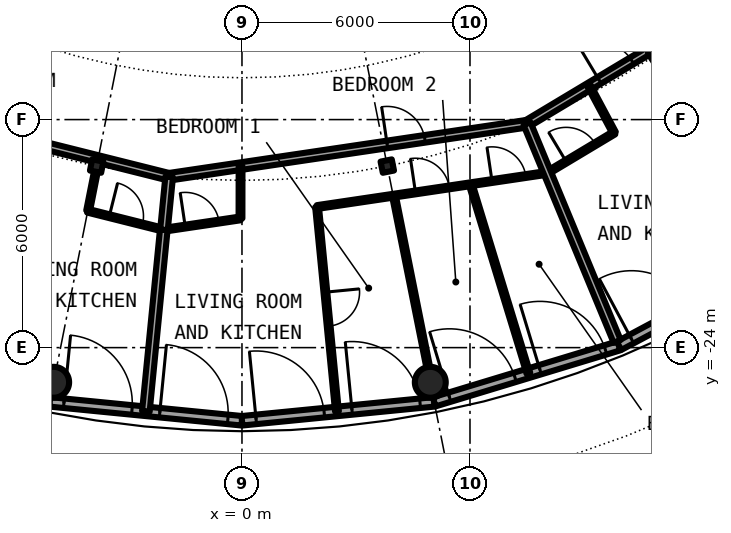
"""IFC4 building model, lengths in metres.
Left out: names, types, materials, properties, quantities, classifications, styles, units other than length and angle.
Written with IfcOpenShell. Run it as: python <this file> out.ifc"""

import sys

from ifc_helpers import new_model, si_unit, direction, frame, frame_2d, origin, origin_2d, place, context, subcontext, project, spatial, rectangle, hollow_circle, i_section, extrude, element, fill, save


model = new_model("IFC4")
c1 = context("Model", 3, precision=1e-05, world=origin(), true_north=direction((0.0, 1.0)))
c2 = subcontext(c1, "Body", "Model", "MODEL_VIEW")
j1 = project(units=[si_unit("LENGTHUNIT", "METRE"), si_unit("PLANEANGLEUNIT", "RADIAN")], contexts=[c1])
p1 = place(None, origin())
s1 = spatial("IfcSite", under=j1, at=p1, CompositionType="ELEMENT")
p2 = place(p1, origin())
s2 = spatial("IfcBuilding", under=s1, at=p2, CompositionType="ELEMENT")
p3 = place(p2, frame((0.0, 0.0, 237.1)))
s3 = spatial("IfcBuildingStorey", under=s2, at=p3, CompositionType="ELEMENT", Elevation=237.1)
for number, where, z_axis, x_axis in (
    (1, (-4.955, -24.912, 0.0), (0.0, 0.0, 1.0), (1.0, 0.0, 0.0)),
    (2, (4.955, -24.912, 0.0), (0.0, 0.0, 1.0), (1.0, 0.0, 0.0)),
):
    element("IfcColumn", number, at=place(p3, frame(where, z_axis=z_axis, x_axis=x_axis)), inside=s3, PredefinedType="COLUMN", context=c2, shape_type="SweptSolid", body=[
        extrude(hollow_circle(Radius=0.406, WallThickness=0.03, at=origin_2d()), origin(), (0.0, 0.0, 1.0), 3.05),
    ])
for number, where, z_axis, x_axis in (
    (3, (-3.824, -19.223, 0.0), (0.0, 0.0, 1.0), (-0.195, -0.981, 0.0)),
    (4, (3.824, -19.223, 0.0), (0.0, 0.0, 1.0), (0.195, -0.981, 0.0)),
    (5, (10.889, -16.297, 0.0), (0.0, 0.0, 1.0), (0.556, -0.831, 0.0)),
):
    element("IfcColumn", number, at=place(p3, frame(where, z_axis=z_axis, x_axis=x_axis)), inside=s3, PredefinedType="COLUMN", context=c2, shape_type="SweptSolid", body=[
        extrude(i_section(OverallWidth=0.3, OverallDepth=0.3, WebThickness=0.011, FlangeThickness=0.019, FilletRadius=0.027, at=origin_2d()), origin(), (0.0, 0.0, 1.0), 3.05),
    ])
p4 = place(p3, frame((-5.058, -25.427, 0.0), z_axis=(0.0, 0.0, 1.0), x_axis=(0.995187279479, -0.097991217788, 0.0)))
e6 = element("IfcWall", 6, at=p4, inside=s3, PredefinedType="SOLIDWALL", context=c2, shape_type="SweptSolid", body=[
    extrude(rectangle(XDim=5.083, YDim=0.25, at=frame_2d((2.541, 0.0))), origin(), (0.0, 0.0, 1.0), 2.7),
])
p5 = place(p4, frame((0.374, 0.0, 0.0)))
e7 = element("IfcOpeningElement", 7, at=p5, cuts=e6, PredefinedType="OPENING", context=c2, shape_type="SweptSolid", body=[
    extrude(rectangle(XDim=1.8, YDim=2.2, at=frame_2d((0.9, 1.1))), frame((0.0, 0.135, 0.0), z_axis=(0.0, -1.0, 0.0), x_axis=(1.0, 0.0, 0.0)), (0.0, 0.0, 1.0), 0.27),
])
p6 = place(p4, frame((2.909, 0.0, 0.0)))
e8 = element("IfcOpeningElement", 8, at=p6, cuts=e6, PredefinedType="OPENING", context=c2, shape_type="SweptSolid", body=[
    extrude(rectangle(XDim=1.8, YDim=2.2, at=frame_2d((0.9, 1.1))), frame((0.0, 0.135, 0.0), z_axis=(0.0, -1.0, 0.0), x_axis=(1.0, 0.0, 0.0)), (0.0, 0.0, 1.0), 0.27),
])
p7 = place(p3, frame((0.0, -25.925, 0.0), z_axis=(0.0, 0.0, 1.0), x_axis=(0.995187279479, 0.097991217788, 0.0)))
e9 = element("IfcWall", 9, at=p7, inside=s3, PredefinedType="SOLIDWALL", context=c2, shape_type="SweptSolid", body=[
    extrude(rectangle(XDim=5.083, YDim=0.25, at=frame_2d((2.541, 0.0))), origin(), (0.0, 0.0, 1.0), 2.7),
])
p8 = place(p7, frame((0.374, 0.0, 0.0)))
e10 = element("IfcOpeningElement", 10, at=p8, cuts=e9, PredefinedType="OPENING", context=c2, shape_type="SweptSolid", body=[
    extrude(rectangle(XDim=1.8, YDim=2.2, at=frame_2d((0.9, 1.1))), frame((0.0, 0.135, 0.0), z_axis=(0.0, -1.0, 0.0), x_axis=(1.0, 0.0, 0.0)), (0.0, 0.0, 1.0), 0.27),
])
p9 = place(p7, frame((2.909, 0.0, 0.0)))
e11 = element("IfcOpeningElement", 11, at=p9, cuts=e9, PredefinedType="OPENING", context=c2, shape_type="SweptSolid", body=[
    extrude(rectangle(XDim=1.8, YDim=2.2, at=frame_2d((0.9, 1.1))), frame((0.0, 0.135, 0.0), z_axis=(0.0, -1.0, 0.0), x_axis=(1.0, 0.0, 0.0)), (0.0, 0.0, 1.0), 0.27),
])
p10 = place(p3, frame((5.058, -25.427, 0.0), z_axis=(0.0, 0.0, 1.0), x_axis=(0.956941126395, 0.290282070774, 0.0)))
e12 = element("IfcWall", 12, at=p10, inside=s3, PredefinedType="SOLIDWALL", context=c2, shape_type="SweptSolid", body=[
    extrude(rectangle(XDim=5.082, YDim=0.25, at=frame_2d((2.541, 0.0))), origin(), (0.0, 0.0, 1.0), 2.7),
])
p11 = place(p10, frame((0.42, 0.0, 0.0)))
e13 = element("IfcOpeningElement", 13, at=p11, cuts=e12, PredefinedType="OPENING", context=c2, shape_type="SweptSolid", body=[
    extrude(rectangle(XDim=1.8, YDim=2.2, at=frame_2d((0.9, 1.1))), frame((0.0, 0.135, 0.0), z_axis=(0.0, -1.0, 0.0), x_axis=(1.0, 0.0, 0.0)), (0.0, 0.0, 1.0), 0.27),
])
p12 = place(p10, frame((2.909, 0.0, 0.0)))
e14 = element("IfcOpeningElement", 14, at=p12, cuts=e12, PredefinedType="OPENING", context=c2, shape_type="SweptSolid", body=[
    extrude(rectangle(XDim=1.8, YDim=2.2, at=frame_2d((0.9, 1.1))), frame((0.0, 0.135, 0.0), z_axis=(0.0, -1.0, 0.0), x_axis=(1.0, 0.0, 0.0)), (0.0, 0.0, 1.0), 0.27),
])
p13 = place(p3, frame((9.921, -23.952, 0.0), z_axis=(0.0, 0.0, 1.0), x_axis=(0.881903089468, 0.47143073806, 0.0)))
e15 = element("IfcWall", 15, at=p13, inside=s3, PredefinedType="SOLIDWALL", context=c2, shape_type="SweptSolid", body=[
    extrude(rectangle(XDim=5.082, YDim=0.25, at=frame_2d((2.541, 0.0))), origin(), (0.0, 0.0, 1.0), 2.7),
])
p14 = place(p13, frame((0.374, 0.0, 0.0)))
e16 = element("IfcOpeningElement", 16, at=p14, cuts=e15, PredefinedType="OPENING", context=c2, shape_type="SweptSolid", body=[
    extrude(rectangle(XDim=1.8, YDim=2.2, at=frame_2d((0.9, 1.1))), frame((0.0, 0.135, 0.0), z_axis=(0.0, -1.0, 0.0), x_axis=(1.0, 0.0, 0.0)), (0.0, 0.0, 1.0), 0.27),
])
p15 = place(p13, frame((2.909, 0.0, 0.0)))
e17 = element("IfcOpeningElement", 17, at=p15, cuts=e15, PredefinedType="OPENING", context=c2, shape_type="SweptSolid", body=[
    extrude(rectangle(XDim=1.8, YDim=2.2, at=frame_2d((0.9, 1.1))), frame((0.0, 0.135, 0.0), z_axis=(0.0, -1.0, 0.0), x_axis=(1.0, 0.0, 0.0)), (0.0, 0.0, 1.0), 0.27),
])
p16 = place(p3, frame((-4.063, -20.398, 0.0), z_axis=(0.0, 0.0, 1.0), x_axis=(0.969939465938, -0.24334632197, 0.0)))
e18 = element("IfcWall", 18, at=p16, inside=s3, PredefinedType="PARTITIONING", context=c2, shape_type="SweptSolid", body=[
    extrude(rectangle(XDim=2.055, YDim=0.1, at=frame_2d((1.027, 0.0))), origin(), (0.0, 0.0, 1.0), 2.7),
])
p17 = place(p16, frame((0.589, 0.0, 0.0)))
e19 = element("IfcOpeningElement", 19, at=p17, cuts=e18, PredefinedType="OPENING", context=c2, shape_type="SweptSolid", body=[
    extrude(rectangle(XDim=0.9, YDim=2.3, at=frame_2d((0.45, 1.15))), frame((0.0, 0.06, 0.0), z_axis=(0.0, -1.0, 0.0), x_axis=(1.0, 0.0, 0.0)), (0.0, 0.0, 1.0), 0.12),
])
p18 = place(p3, frame((8.036, -19.401, 0.0), z_axis=(0.0, 0.0, 1.0), x_axis=(0.857796869978, 0.513988842152, 0.0)))
e20 = element("IfcWall", 20, at=p18, inside=s3, PredefinedType="PARTITIONING", context=c2, shape_type="SweptSolid", body=[
    extrude(rectangle(XDim=2.054, YDim=0.1, at=frame_2d((1.027, 0.0))), origin(), (0.0, 0.0, 1.0), 2.7),
])
p19 = place(p18, frame((0.577, 0.0, 0.0)))
e21 = element("IfcOpeningElement", 21, at=p19, cuts=e20, PredefinedType="OPENING", context=c2, shape_type="SweptSolid", body=[
    extrude(rectangle(XDim=0.9, YDim=2.3, at=frame_2d((0.45, 1.15))), frame((0.0, 0.06, 0.0), z_axis=(0.0, -1.0, 0.0), x_axis=(1.0, 0.0, 0.0)), (0.0, 0.0, 1.0), 0.12),
])
p20 = place(p3, frame((-2.061, -20.9, 0.0), z_axis=(0.0, 0.0, 1.0), x_axis=(0.989154601185, 0.146878095557, 0.0)))
e22 = element("IfcWall", 22, at=p20, inside=s3, PredefinedType="PARTITIONING", context=c2, shape_type="SweptSolid", body=[
    extrude(rectangle(XDim=2.041, YDim=0.1, at=frame_2d((1.021, 0.0))), origin(), (0.0, 0.0, 1.0), 2.7),
])
p21 = place(p20, frame((0.574, 0.0, 0.0)))
e23 = element("IfcOpeningElement", 23, at=p21, cuts=e22, PredefinedType="OPENING", context=c2, shape_type="SweptSolid", body=[
    extrude(rectangle(XDim=0.9, YDim=2.3, at=frame_2d((0.45, 1.15))), frame((0.0, 0.06, 0.0), z_axis=(0.0, -1.0, 0.0), x_axis=(1.0, 0.0, 0.0)), (0.0, 0.0, 1.0), 0.12),
])
p22 = place(p3, frame((1.976, -20.301, 0.0), z_axis=(0.0, 0.0, 1.0), x_axis=(0.989146687273, 0.146931382135, 0.0)))
e24 = element("IfcWall", 24, at=p22, inside=s3, PredefinedType="PARTITIONING", context=c2, shape_type="SweptSolid", body=[
    extrude(rectangle(XDim=6.126, YDim=0.1, at=frame_2d((3.063, 0.0))), origin(), (0.0, 0.0, 1.0), 2.7),
])
p23 = place(p22, frame((2.618, 0.0, 0.0)))
e25 = element("IfcOpeningElement", 25, at=p23, cuts=e24, PredefinedType="OPENING", context=c2, shape_type="SweptSolid", body=[
    extrude(rectangle(XDim=0.9, YDim=2.3, at=frame_2d((0.45, 1.15))), frame((0.0, 0.06, 0.0), z_axis=(0.0, -1.0, 0.0), x_axis=(1.0, 0.0, 0.0)), (0.0, 0.0, 1.0), 0.12),
])
p24 = place(p22, frame((4.654, 0.0, 0.0)))
e26 = element("IfcOpeningElement", 26, at=p24, cuts=e24, PredefinedType="OPENING", context=c2, shape_type="SweptSolid", body=[
    extrude(rectangle(XDim=0.9, YDim=2.3, at=frame_2d((0.45, 1.15))), frame((0.0, 0.06, 0.0), z_axis=(0.0, -1.0, 0.0), x_axis=(1.0, 0.0, 0.0)), (0.0, 0.0, 1.0), 0.12),
])
p25 = place(p3, frame((-7.501, -18.108, 0.0), z_axis=(0.0, 0.0, 1.0), x_axis=(0.970012544183, -0.243054858266, 0.0)))
e27 = element("IfcWall", 27, at=p25, inside=s3, PredefinedType="PARTITIONING", context=c2, shape_type="SweptSolid", body=[
    extrude(rectangle(XDim=5.753, YDim=0.2, at=frame_2d((2.876, 0.0))), origin(), (0.0, 0.0, 1.0), 2.45),
])
p26 = place(p25, frame((1.417, 0.0, 0.0)))
e28 = element("IfcOpeningElement", 28, at=p26, cuts=e27, PredefinedType="OPENING", context=c2, shape_type="SweptSolid", body=[
    extrude(rectangle(XDim=1.0, YDim=2.3, at=frame_2d((0.5, 1.15))), frame((0.0, 0.11, 0.0), z_axis=(0.0, -1.0, 0.0), x_axis=(1.0, 0.0, 0.0)), (0.0, 0.0, 1.0), 0.22),
])
p27 = place(p3, frame((7.495, -18.111, 0.0), z_axis=(0.0, 0.0, 1.0), x_axis=(0.85773600187, 0.514090411403, 0.0)))
e29 = element("IfcWall", 29, at=p27, inside=s3, PredefinedType="PARTITIONING", context=c2, shape_type="SweptSolid", body=[
    extrude(rectangle(XDim=5.758, YDim=0.2, at=frame_2d((2.879, 0.0))), origin(), (0.0, 0.0, 1.0), 2.45),
])
p28 = place(p27, frame((2.224, 0.0, 0.0)))
e30 = element("IfcOpeningElement", 30, at=p28, cuts=e29, PredefinedType="OPENING", context=c2, shape_type="SweptSolid", body=[
    extrude(rectangle(XDim=1.0, YDim=2.3, at=frame_2d((0.5, 1.15))), frame((0.0, 0.11, 0.0), z_axis=(0.0, -1.0, 0.0), x_axis=(1.0, 0.0, 0.0)), (0.0, 0.0, 1.0), 0.22),
])
p29 = place(p3, frame((-1.927, -19.506, 0.0), z_axis=(0.0, 0.0, 1.0), x_axis=(0.989181308547, 0.146698121399, 0.0)))
e31 = element("IfcWall", 31, at=p29, inside=s3, PredefinedType="PARTITIONING", context=c2, shape_type="SweptSolid", body=[
    extrude(rectangle(XDim=9.531, YDim=0.2, at=frame_2d((4.766, 0.0))), origin(), (0.0, 0.0, 1.0), 2.45),
])
p30 = place(p29, frame((5.811, 0.0, 0.0)))
e32 = element("IfcOpeningElement", 32, at=p30, cuts=e31, PredefinedType="OPENING", context=c2, shape_type="SweptSolid", body=[
    extrude(rectangle(XDim=1.0, YDim=2.3, at=frame_2d((0.5, 1.15))), frame((0.0, 0.11, 0.0), z_axis=(0.0, -1.0, 0.0), x_axis=(1.0, 0.0, 0.0)), (0.0, 0.0, 1.0), 0.22),
])
p31 = place(p3, frame((-4.049, -20.4, 0.0), z_axis=(0.0, 0.0, 1.0), x_axis=(0.194771831703, 0.980848578311, 0.0)))
e33 = element("IfcWall", 33, at=p31, inside=s3, PredefinedType="PARTITIONING", context=c2, shape_type="SweptSolid", body=[
    extrude(rectangle(XDim=1.048, YDim=0.1, at=frame_2d((0.524, 0.0))), origin(), (0.0, 0.0, 1.0), 2.7),
])
p32 = place(p3, frame((-2.529, -25.676, 0.0), z_axis=(0.0, 0.0, 1.0), x_axis=(0.098108750677, 0.995175699583, 0.0)))
e34 = element("IfcWall", 34, at=p32, inside=s3, PredefinedType="PARTITIONING", context=c2, shape_type="SweptSolid", body=[
    extrude(rectangle(XDim=4.8, YDim=0.2, at=frame_2d((2.4, 0.0))), origin(), (0.0, 0.0, 1.0), 2.7),
])
p33 = place(p3, frame((-2.053, -20.9, 0.0), z_axis=(0.0, 0.0, 1.0), x_axis=(0.097862778951, 0.995199917854, 0.0)))
e35 = element("IfcWall", 35, at=p33, inside=s3, PredefinedType="PARTITIONING", context=c2, shape_type="SweptSolid", body=[
    extrude(rectangle(XDim=1.4, YDim=0.2, at=frame_2d((0.7, 0.0))), origin(), (0.0, 0.0, 1.0), 2.7),
])
p34 = place(p3, frame((1.976, -20.3, 0.0), z_axis=(0.0, 0.0, 1.0), x_axis=(0.096962417892, -0.995288043491, 0.0)))
e36 = element("IfcWall", 36, at=p34, inside=s3, PredefinedType="PARTITIONING", context=c2, shape_type="SweptSolid", body=[
    extrude(rectangle(XDim=5.403, YDim=0.1, at=frame_2d((2.702, 0.0))), origin(), (0.0, 0.0, 1.0), 2.7),
])
p35 = place(p34, frame((2.252, 0.0, 0.0)))
e37 = element("IfcOpeningElement", 37, at=p35, cuts=e36, PredefinedType="OPENING", context=c2, shape_type="SweptSolid", body=[
    extrude(rectangle(XDim=0.9, YDim=2.3, at=frame_2d((0.45, 1.15))), frame((0.0, 0.06, 0.0), z_axis=(0.0, -1.0, 0.0), x_axis=(1.0, 0.0, 0.0)), (0.0, 0.0, 1.0), 0.12),
])
p36 = place(p3, frame((3.998, -20.0, 0.0), z_axis=(0.0, 0.0, 1.0), x_axis=(0.196034579116, -0.980596983368, 0.0)))
e38 = element("IfcWall", 38, at=p36, inside=s3, PredefinedType="PARTITIONING", context=c2, shape_type="SweptSolid", body=[
    extrude(rectangle(XDim=4.605, YDim=0.1, at=frame_2d((2.303, 0.0))), origin(), (0.0, 0.0, 1.0), 2.7),
])
p37 = place(p3, frame((6.017, -19.701, 0.0), z_axis=(0.0, 0.0, 1.0), x_axis=(0.292244771208, -0.956343554222, 0.0)))
e39 = element("IfcWall", 39, at=p37, inside=s3, PredefinedType="PARTITIONING", context=c2, shape_type="SweptSolid", body=[
    extrude(rectangle(XDim=5.201, YDim=0.1, at=frame_2d((2.601, 0.0))), origin(), (0.0, 0.0, 1.0), 2.7),
])
p38 = place(p3, frame((7.501, -18.108, 0.0), z_axis=(0.0, 0.0, 1.0), x_axis=(0.382606842458, -0.92391125337, 0.0)))
e40 = element("IfcWall", 40, at=p38, inside=s3, PredefinedType="PARTITIONING", context=c2, shape_type="SweptSolid", body=[
    extrude(rectangle(XDim=6.2, YDim=0.2, at=frame_2d((3.1, 0.0))), origin(), (0.0, 0.0, 1.0), 2.7),
])
p39 = place(p3, frame((9.14, -17.124, 0.0), z_axis=(0.0, 0.0, 1.0), x_axis=(0.471072596947, -0.882094444153, 0.0)))
e41 = element("IfcWall", 41, at=p39, inside=s3, PredefinedType="PARTITIONING", context=c2, shape_type="SweptSolid", body=[
    extrude(rectangle(XDim=1.386, YDim=0.1, at=frame_2d((0.693, 0.0))), origin(), (0.0, 0.0, 1.0), 2.7),
])
p40 = place(p3, frame((-0.039, -20.599, 0.0), z_axis=(0.0, 0.0, 1.0), x_axis=(0.001422473668, 0.999998988284, 0.0)))
e42 = element("IfcWall", 42, at=p40, inside=s3, PredefinedType="PARTITIONING", context=c2, shape_type="SweptSolid", body=[
    extrude(rectangle(XDim=1.373, YDim=0.1, at=frame_2d((0.687, 0.0))), origin(), (0.0, 0.0, 1.0), 2.7),
])
p41 = place(p5, origin())
e43 = element("IfcDoor", 43, at=p41, inside=s3, OperationType="SINGLE_SWING_LEFT", PredefinedType="DOOR", context=c2, shape_type="SweptSolid", body=[
    extrude(rectangle(XDim=1.8, YDim=2.2, at=frame_2d((0.9, 1.1))), frame((0.0, 0.025, 0.0), z_axis=(0.0, -1.0, 0.0), x_axis=(1.0, 0.0, 0.0)), (0.0, 0.0, 1.0), 0.05),
])
fill(e7, e43)
p42 = place(p6, origin())
e44 = element("IfcDoor", 44, at=p42, inside=s3, OperationType="SINGLE_SWING_LEFT", PredefinedType="DOOR", context=c2, shape_type="SweptSolid", body=[
    extrude(rectangle(XDim=1.8, YDim=2.2, at=frame_2d((0.9, 1.1))), frame((0.0, 0.025, 0.0), z_axis=(0.0, -1.0, 0.0), x_axis=(1.0, 0.0, 0.0)), (0.0, 0.0, 1.0), 0.05),
])
fill(e8, e44)
p43 = place(p8, origin())
e45 = element("IfcDoor", 45, at=p43, inside=s3, OperationType="SINGLE_SWING_LEFT", PredefinedType="DOOR", context=c2, shape_type="SweptSolid", body=[
    extrude(rectangle(XDim=1.8, YDim=2.2, at=frame_2d((0.9, 1.1))), frame((0.0, 0.025, 0.0), z_axis=(0.0, -1.0, 0.0), x_axis=(1.0, 0.0, 0.0)), (0.0, 0.0, 1.0), 0.05),
])
fill(e10, e45)
p44 = place(p9, origin())
e46 = element("IfcDoor", 46, at=p44, inside=s3, OperationType="SINGLE_SWING_LEFT", PredefinedType="DOOR", context=c2, shape_type="SweptSolid", body=[
    extrude(rectangle(XDim=1.8, YDim=2.2, at=frame_2d((0.9, 1.1))), frame((0.0, 0.025, 0.0), z_axis=(0.0, -1.0, 0.0), x_axis=(1.0, 0.0, 0.0)), (0.0, 0.0, 1.0), 0.05),
])
fill(e11, e46)
p45 = place(p11, origin())
e47 = element("IfcDoor", 47, at=p45, inside=s3, OperationType="SINGLE_SWING_LEFT", PredefinedType="DOOR", context=c2, shape_type="SweptSolid", body=[
    extrude(rectangle(XDim=1.8, YDim=2.2, at=frame_2d((0.9, 1.1))), frame((0.0, 0.025, 0.0), z_axis=(0.0, -1.0, 0.0), x_axis=(1.0, 0.0, 0.0)), (0.0, 0.0, 1.0), 0.05),
])
fill(e13, e47)
p46 = place(p12, origin())
e48 = element("IfcDoor", 48, at=p46, inside=s3, OperationType="SINGLE_SWING_LEFT", PredefinedType="DOOR", context=c2, shape_type="SweptSolid", body=[
    extrude(rectangle(XDim=1.8, YDim=2.2, at=frame_2d((0.9, 1.1))), frame((0.0, 0.025, 0.0), z_axis=(0.0, -1.0, 0.0), x_axis=(1.0, 0.0, 0.0)), (0.0, 0.0, 1.0), 0.05),
])
fill(e14, e48)
p47 = place(p14, origin())
e49 = element("IfcDoor", 49, at=p47, inside=s3, OperationType="SINGLE_SWING_LEFT", PredefinedType="DOOR", context=c2, shape_type="SweptSolid", body=[
    extrude(rectangle(XDim=1.8, YDim=2.2, at=frame_2d((0.9, 1.1))), frame((0.0, 0.025, 0.0), z_axis=(0.0, -1.0, 0.0), x_axis=(1.0, 0.0, 0.0)), (0.0, 0.0, 1.0), 0.05),
])
fill(e16, e49)
p48 = place(p17, origin())
e50 = element("IfcDoor", 50, at=p48, inside=s3, OperationType="SINGLE_SWING_RIGHT", PredefinedType="DOOR", context=c2, shape_type="SweptSolid", body=[
    extrude(rectangle(XDim=0.9, YDim=2.3, at=frame_2d((0.45, 1.15))), frame((0.0, 0.025, 0.0), z_axis=(0.0, -1.0, 0.0), x_axis=(1.0, 0.0, 0.0)), (0.0, 0.0, 1.0), 0.05),
])
fill(e19, e50)
p49 = place(p30, origin())
e51 = element("IfcDoor", 51, at=p49, inside=s3, OperationType="SINGLE_SWING_RIGHT", PredefinedType="DOOR", context=c2, shape_type="SweptSolid", body=[
    extrude(rectangle(XDim=1.0, YDim=2.3, at=frame_2d((0.5, 1.15))), frame((0.0, 0.025, 0.0), z_axis=(0.0, -1.0, 0.0), x_axis=(1.0, 0.0, 0.0)), (0.0, 0.0, 1.0), 0.05),
])
fill(e32, e51)
p50 = place(p21, origin())
e52 = element("IfcDoor", 52, at=p50, inside=s3, OperationType="SINGLE_SWING_RIGHT", PredefinedType="DOOR", context=c2, shape_type="SweptSolid", body=[
    extrude(rectangle(XDim=0.9, YDim=2.3, at=frame_2d((0.45, 1.15))), frame((0.0, 0.025, 0.0), z_axis=(0.0, -1.0, 0.0), x_axis=(1.0, 0.0, 0.0)), (0.0, 0.0, 1.0), 0.05),
])
fill(e23, e52)
p51 = place(p35, origin())
e53 = element("IfcDoor", 53, at=p51, inside=s3, OperationType="SINGLE_SWING_RIGHT", PredefinedType="DOOR", context=c2, shape_type="SweptSolid", body=[
    extrude(rectangle(XDim=0.9, YDim=2.3, at=frame_2d((0.45, 1.15))), frame((0.0, 0.025, 0.0), z_axis=(0.0, -1.0, 0.0), x_axis=(1.0, 0.0, 0.0)), (0.0, 0.0, 1.0), 0.05),
])
fill(e37, e53)
p52 = place(p23, origin())
e54 = element("IfcDoor", 54, at=p52, inside=s3, OperationType="SINGLE_SWING_RIGHT", PredefinedType="DOOR", context=c2, shape_type="SweptSolid", body=[
    extrude(rectangle(XDim=0.9, YDim=2.3, at=frame_2d((0.45, 1.15))), frame((0.0, 0.025, 0.0), z_axis=(0.0, -1.0, 0.0), x_axis=(1.0, 0.0, 0.0)), (0.0, 0.0, 1.0), 0.05),
])
fill(e25, e54)
p53 = place(p24, origin())
e55 = element("IfcDoor", 55, at=p53, inside=s3, OperationType="SINGLE_SWING_RIGHT", PredefinedType="DOOR", context=c2, shape_type="SweptSolid", body=[
    extrude(rectangle(XDim=0.9, YDim=2.3, at=frame_2d((0.45, 1.15))), frame((0.0, 0.025, 0.0), z_axis=(0.0, -1.0, 0.0), x_axis=(1.0, 0.0, 0.0)), (0.0, 0.0, 1.0), 0.05),
])
fill(e26, e55)
p54 = place(p28, origin())
e56 = element("IfcDoor", 56, at=p54, inside=s3, OperationType="SINGLE_SWING_LEFT", PredefinedType="DOOR", context=c2, shape_type="SweptSolid", body=[
    extrude(rectangle(XDim=1.0, YDim=2.3, at=frame_2d((0.5, 1.15))), frame((0.0, 0.025, 0.0), z_axis=(0.0, -1.0, 0.0), x_axis=(1.0, 0.0, 0.0)), (0.0, 0.0, 1.0), 0.05),
])
fill(e30, e56)
p55 = place(p19, origin())
e57 = element("IfcDoor", 57, at=p55, inside=s3, OperationType="SINGLE_SWING_LEFT", PredefinedType="DOOR", context=c2, shape_type="SweptSolid", body=[
    extrude(rectangle(XDim=0.9, YDim=2.3, at=frame_2d((0.45, 1.15))), frame((0.0, 0.025, 0.0), z_axis=(0.0, -1.0, 0.0), x_axis=(1.0, 0.0, 0.0)), (0.0, 0.0, 1.0), 0.05),
])
fill(e21, e57)
save(model, sys.argv[1])
